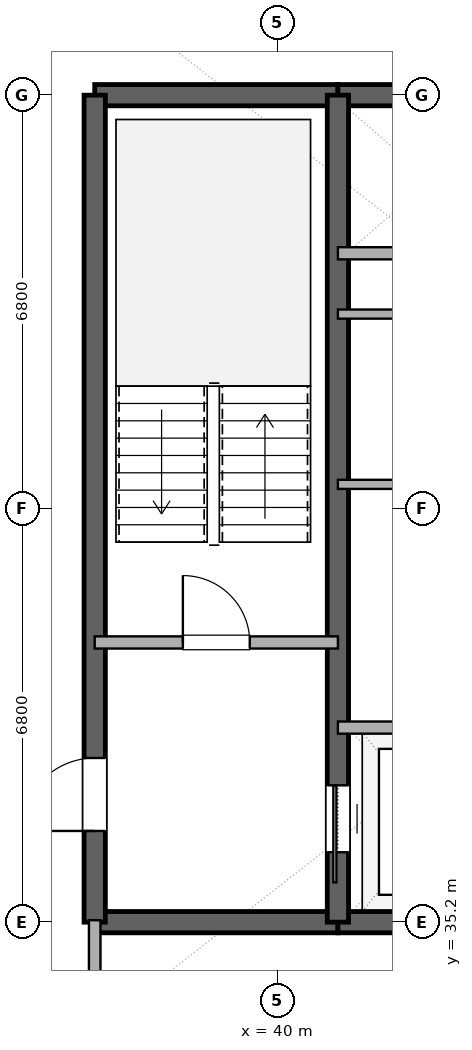
"""IFC4 building model, lengths in metres.
Left out: names, types, materials, properties, quantities, classifications, styles, units other than length and angle.
Written with IfcOpenShell. Run it as: python <this file> out.ifc"""

import sys

from ifc_helpers import new_model, si_unit, direction, frame, frame_2d, origin, place, context, subcontext, project, spatial, rectangle, extrude, element, fill, save


model = new_model("IFC4")
c1 = context("Model", 3, precision=1e-05, world=origin(), true_north=direction((0.0, 1.0)))
c2 = subcontext(c1, "Body", "Model", "MODEL_VIEW")
j1 = project(units=[si_unit("LENGTHUNIT", "METRE"), si_unit("PLANEANGLEUNIT", "RADIAN")], contexts=[c1])
p1 = place(None, origin())
s1 = spatial("IfcSite", under=j1, at=p1, CompositionType="ELEMENT")
p2 = place(p1, origin())
s2 = spatial("IfcBuilding", under=s1, at=p2, CompositionType="ELEMENT")
p3 = place(p2, frame((0.0, 0.0, 291.0)))
s3 = spatial("IfcBuildingStorey", under=s2, at=p3, CompositionType="ELEMENT", Elevation=291.0)
p4 = place(p3, frame((37.0, 35.2, 0.0), z_axis=(0.0, 0.0, 1.0), x_axis=(1.0, 0.0, 0.0)))
e1 = element("IfcWall", 1, at=p4, inside=s3, PredefinedType="SHEAR", context=c2, shape_type="SweptSolid", body=[
    extrude(rectangle(XDim=4.0, YDim=0.35, at=frame_2d((2.0, 0.0))), origin(), (0.0, 0.0, 1.0), 3.37),
])
p5 = place(p3, frame((41.0, 35.2, 0.0), z_axis=(0.0, 0.0, 1.0), x_axis=(1.0, 0.0, 0.0)))
e2 = element("IfcWall", 2, at=p5, inside=s3, PredefinedType="SHEAR", context=c2, shape_type="SweptSolid", body=[
    extrude(rectangle(XDim=14.0, YDim=0.35, at=frame_2d((7.0, 0.0))), origin(), (0.0, 0.0, 1.0), 3.37),
])
p6 = place(p5, frame((6.1, 0.0, 0.0)))
e3 = element("IfcOpeningElement", 3, at=p6, cuts=e2, PredefinedType="OPENING", context=c2, shape_type="SweptSolid", body=[
    extrude(rectangle(XDim=1.8, YDim=2.25, at=frame_2d((0.9, 1.125))), frame((0.0, 0.185, 0.0), z_axis=(0.0, -1.0, 0.0), x_axis=(1.0, 0.0, 0.0)), (0.0, 0.0, 1.0), 0.37),
])
p7 = place(p3, frame((37.0, 48.8, 0.0), z_axis=(0.0, 0.0, 1.0), x_axis=(1.0, 0.0, 0.0)))
e4 = element("IfcWall", 4, at=p7, inside=s3, PredefinedType="SHEAR", context=c2, shape_type="SweptSolid", body=[
    extrude(rectangle(XDim=4.0, YDim=0.35, at=frame_2d((2.0, 0.0))), origin(), (0.0, 0.0, 1.0), 3.37),
])
p8 = place(p3, frame((41.0, 48.8, 0.0), z_axis=(0.0, 0.0, 1.0), x_axis=(1.0, 0.0, 0.0)))
e5 = element("IfcWall", 5, at=p8, inside=s3, PredefinedType="SHEAR", context=c2, shape_type="SweptSolid", body=[
    extrude(rectangle(XDim=14.0, YDim=0.35, at=frame_2d((7.0, 0.0))), origin(), (0.0, 0.0, 1.0), 3.37),
])
p9 = place(p8, frame((6.1, 0.0, 0.0)))
e6 = element("IfcOpeningElement", 6, at=p9, cuts=e5, PredefinedType="OPENING", context=c2, shape_type="SweptSolid", body=[
    extrude(rectangle(XDim=1.8, YDim=2.25, at=frame_2d((0.9, 1.125))), frame((0.0, 0.185, 0.0), z_axis=(0.0, -1.0, 0.0), x_axis=(1.0, 0.0, 0.0)), (0.0, 0.0, 1.0), 0.37),
])
p10 = place(p3, frame((37.0, 35.2, 0.0), z_axis=(0.0, 0.0, 1.0), x_axis=(0.0, 1.0, 0.0)))
e7 = element("IfcWall", 7, at=p10, inside=s3, PredefinedType="SHEAR", context=c2, shape_type="SweptSolid", body=[
    extrude(rectangle(XDim=13.6, YDim=0.35, at=frame_2d((6.8, 0.0))), origin(), (0.0, 0.0, 1.0), 3.37),
])
p11 = place(p10, frame((1.5, 0.0, 0.0)))
e8 = element("IfcOpeningElement", 8, at=p11, cuts=e7, PredefinedType="OPENING", context=c2, shape_type="SweptSolid", body=[
    extrude(rectangle(XDim=1.2, YDim=2.15, at=frame_2d((0.6, 1.075))), frame((0.0, 0.185, 0.0), z_axis=(0.0, -1.0, 0.0), x_axis=(1.0, 0.0, 0.0)), (0.0, 0.0, 1.0), 0.37),
])
p12 = place(p3, frame((41.0, 35.2, 0.0), z_axis=(0.0, 0.0, 1.0), x_axis=(0.0, 1.0, 0.0)))
e9 = element("IfcWall", 9, at=p12, inside=s3, PredefinedType="SHEAR", context=c2, shape_type="SweptSolid", body=[
    extrude(rectangle(XDim=13.6, YDim=0.35, at=frame_2d((6.8, 0.0))), origin(), (0.0, 0.0, 1.0), 3.37),
])
p13 = place(p12, frame((1.15, 0.0, 0.0)))
e10 = element("IfcOpeningElement", 10, at=p13, cuts=e9, PredefinedType="OPENING", context=c2, shape_type="SweptSolid", body=[
    extrude(rectangle(XDim=1.1, YDim=2.2, at=frame_2d((0.55, 1.1))), frame((0.0, 0.185, 0.0), z_axis=(0.0, -1.0, 0.0), x_axis=(1.0, 0.0, 0.0)), (0.0, 0.0, 1.0), 0.37),
])
p14 = place(p3, frame((37.0, 39.8, 0.0), z_axis=(0.0, 0.0, 1.0), x_axis=(1.0, 0.0, 0.0)))
e11 = element("IfcWall", 11, at=p14, inside=s3, PredefinedType="SOLIDWALL", context=c2, shape_type="SweptSolid", body=[
    extrude(rectangle(XDim=4.0, YDim=0.2, at=frame_2d((2.0, 0.0))), origin(), (0.0, 0.0, 1.0), 2.73),
])
p15 = place(p14, frame((1.45, 0.0, 0.0)))
e12 = element("IfcOpeningElement", 12, at=p15, cuts=e11, PredefinedType="OPENING", context=c2, shape_type="SweptSolid", body=[
    extrude(rectangle(XDim=1.1, YDim=2.15, at=frame_2d((0.55, 1.075))), frame((0.0, 0.11, 0.0), z_axis=(0.0, -1.0, 0.0), x_axis=(1.0, 0.0, 0.0)), (0.0, 0.0, 1.0), 0.22),
])
for number, where, z_axis, x_axis in (
    (13, (41.0, 38.4, 0.0), (0.0, 0.0, 1.0), (1.0, 0.0, 0.0)),
    (14, (41.0, 46.2, 0.0), (0.0, 0.0, 1.0), (1.0, 0.0, 0.0)),
):
    element("IfcWall", number, at=place(p3, frame(where, z_axis=z_axis, x_axis=x_axis)), inside=s3, PredefinedType="SOLIDWALL", context=c2, shape_type="SweptSolid", body=[
        extrude(rectangle(XDim=2.95, YDim=0.2, at=frame_2d((1.475, 0.0))), origin(), (0.0, 0.0, 1.0), 2.73),
    ])
for number, where, z_axis, x_axis in (
    (15, (41.0, 42.4, 0.0), (0.0, 0.0, 1.0), (1.0, 0.0, 0.0)),
    (16, (41.0, 45.2, 0.0), (0.0, 0.0, 1.0), (1.0, 0.0, 0.0)),
):
    element("IfcWall", number, at=place(p3, frame(where, z_axis=z_axis, x_axis=x_axis)), inside=s3, PredefinedType="PARTITIONING", context=c2, shape_type="SweptSolid", body=[
        extrude(rectangle(XDim=4.85, YDim=0.15, at=frame_2d((2.425, 0.0))), origin(), (0.0, 0.0, 1.0), 2.73),
    ])
p16 = place(p3, frame((42.687, 35.2, 0.0), z_axis=(0.0, 0.0, 1.0), x_axis=(-0.615663811723, -0.788008928208, 0.0)))
e17 = element("IfcWall", 17, at=p16, inside=s3, PredefinedType="PARTITIONING", context=c2, shape_type="SweptSolid", body=[
    extrude(rectangle(XDim=12.701, YDim=0.2, at=frame_2d((6.351, 0.0))), origin(), (0.0, 0.0, 1.0), 2.73),
])
p17 = place(p3, frame((37.0, 35.232, 0.0), z_axis=(0.0, 0.0, 1.0), x_axis=(0.0, -1.0, 0.0)))
e18 = element("IfcWall", 18, at=p17, inside=s3, PredefinedType="PARTITIONING", context=c2, shape_type="SweptSolid", body=[
    extrude(rectangle(XDim=1.232, YDim=0.19, at=frame_2d((0.616, 0.0))), origin(), (0.0, 0.0, 1.0), 2.73),
])
p18 = place(p13, origin())
e19 = element("IfcDoor", 19, at=p18, inside=s3, OperationType="SLIDING_TO_LEFT", PredefinedType="DOOR", context=c2, shape_type="SweptSolid", body=[
    extrude(rectangle(XDim=1.1, YDim=2.2, at=frame_2d((0.55, 1.1))), frame((0.0, 0.025, 0.0), z_axis=(0.0, -1.0, 0.0), x_axis=(1.0, 0.0, 0.0)), (0.0, 0.0, 1.0), 0.05),
])
fill(e10, e19)
p19 = place(p11, origin())
e20 = element("IfcDoor", 20, at=p19, inside=s3, OperationType="SINGLE_SWING_LEFT", PredefinedType="DOOR", context=c2, shape_type="SweptSolid", body=[
    extrude(rectangle(XDim=1.2, YDim=2.15, at=frame_2d((0.6, 1.075))), frame((0.0, 0.025, 0.0), z_axis=(0.0, -1.0, 0.0), x_axis=(1.0, 0.0, 0.0)), (0.0, 0.0, 1.0), 0.05),
])
fill(e8, e20)
p20 = place(p15, origin())
e21 = element("IfcDoor", 21, at=p20, inside=s3, OperationType="SINGLE_SWING_LEFT", PredefinedType="DOOR", context=c2, shape_type="SweptSolid", body=[
    extrude(rectangle(XDim=1.1, YDim=2.15, at=frame_2d((0.55, 1.075))), frame((0.0, 0.025, 0.0), z_axis=(0.0, -1.0, 0.0), x_axis=(1.0, 0.0, 0.0)), (0.0, 0.0, 1.0), 0.05),
])
fill(e12, e21)
save(model, sys.argv[1])
